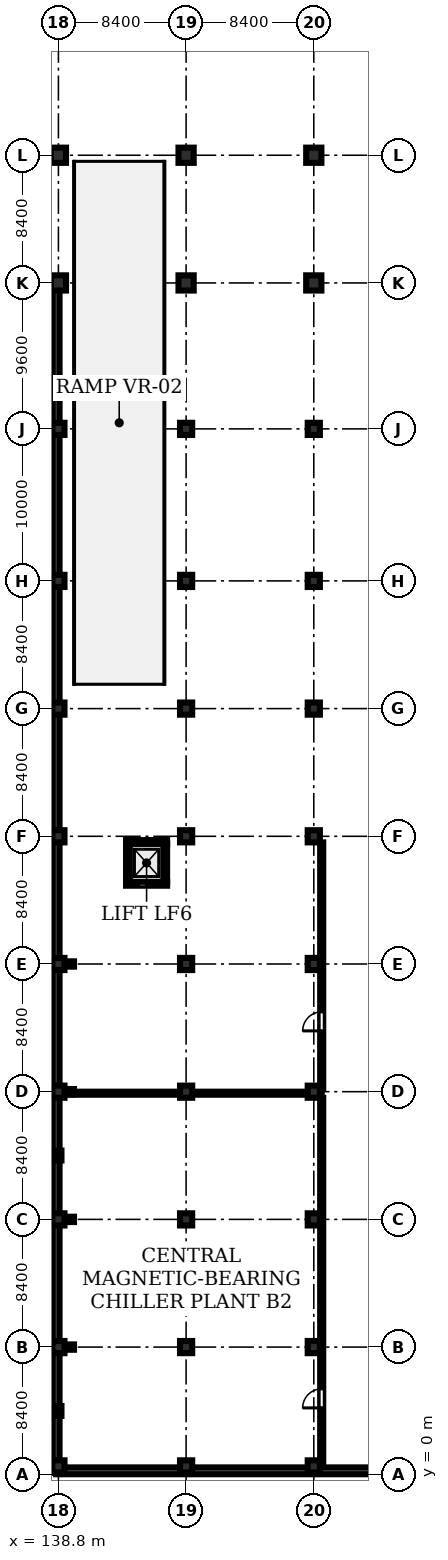
"""IFC4 building model, lengths in metres.
Left out: names, types, materials, properties, quantities, classifications, styles, units other than length and angle.
Written with IfcOpenShell. Run it as: python <this file> out.ifc"""

import sys

from ifc_helpers import new_model, si_unit, direction, frame, frame_2d, origin, origin_2d, place, context, subcontext, project, spatial, rectangle, i_section, extrude, element, fill, save


model = new_model("IFC4")
c1 = context("Model", 3, precision=1e-05, world=origin(), true_north=direction((0.0, 1.0)))
c2 = subcontext(c1, "Body", "Model", "MODEL_VIEW")
j1 = project(units=[si_unit("LENGTHUNIT", "METRE"), si_unit("PLANEANGLEUNIT", "RADIAN")], contexts=[c1])
p1 = place(None, origin())
s1 = spatial("IfcSite", under=j1, at=p1, CompositionType="ELEMENT")
p2 = place(p1, origin())
s2 = spatial("IfcBuilding", under=s1, at=p2, CompositionType="ELEMENT")
p3 = place(p2, frame((0.0, 0.0, -9.6)))
s3 = spatial("IfcBuildingStorey", under=s2, at=p3, CompositionType="ELEMENT", Elevation=-9.6)
for number, where, z_axis, x_axis in (
    (1, (138.8, 0.55, 0.0), (0.0, 0.0, 1.0), (1.0, 0.0, 0.0)),
    (2, (138.8, 8.4, 0.0), (0.0, 0.0, 1.0), (1.0, 0.0, 0.0)),
    (3, (138.8, 16.8, 0.0), (0.0, 0.0, 1.0), (1.0, 0.0, 0.0)),
    (4, (138.8, 25.2, 0.0), (0.0, 0.0, 1.0), (1.0, 0.0, 0.0)),
    (5, (138.8, 33.6, 0.0), (0.0, 0.0, 1.0), (1.0, 0.0, 0.0)),
    (6, (138.8, 42.0, 0.0), (0.0, 0.0, 1.0), (1.0, 0.0, 0.0)),
    (7, (138.8, 50.4, 0.0), (0.0, 0.0, 1.0), (1.0, 0.0, 0.0)),
    (8, (138.8, 58.8, 0.0), (0.0, 0.0, 1.0), (1.0, 0.0, 0.0)),
    (9, (138.8, 68.8, 0.0), (0.0, 0.0, 1.0), (1.0, 0.0, 0.0)),
):
    element("IfcColumn", number, at=place(p3, frame(where, z_axis=z_axis, x_axis=x_axis)), inside=s3, PredefinedType="COLUMN", context=c2, shape_type="SweptSolid", body=[
        extrude(rectangle(XDim=0.8, YDim=0.8, at=origin_2d()), origin(), (0.0, 0.0, 1.0), 4.48),
    ])
for number, where, z_axis, x_axis in (
    (10, (138.8, 78.4, 0.0), (0.0, 0.0, 1.0), (1.0, 0.0, 0.0)),
    (11, (138.8, 86.8, 0.0), (0.0, 0.0, 1.0), (1.0, 0.0, 0.0)),
):
    element("IfcColumn", number, at=place(p3, frame(where, z_axis=z_axis, x_axis=x_axis)), inside=s3, PredefinedType="COLUMN", context=c2, shape_type="SweptSolid", body=[
        extrude(rectangle(XDim=1.0, YDim=1.0, at=origin_2d()), origin(), (0.0, 0.0, 1.0), 4.48),
    ])
for number, where, z_axis, x_axis in (
    (12, (147.2, 0.55, 0.0), (0.0, 0.0, 1.0), (1.0, 0.0, 0.0)),
    (13, (147.2, 8.4, 0.0), (0.0, 0.0, 1.0), (1.0, 0.0, 0.0)),
    (14, (147.2, 16.8, 0.0), (0.0, 0.0, 1.0), (1.0, 0.0, 0.0)),
    (15, (147.2, 25.2, 0.0), (0.0, 0.0, 1.0), (1.0, 0.0, 0.0)),
    (16, (147.2, 33.6, 0.0), (0.0, 0.0, 1.0), (1.0, 0.0, 0.0)),
    (17, (147.2, 42.0, 0.0), (0.0, 0.0, 1.0), (1.0, 0.0, 0.0)),
    (18, (147.2, 50.4, 0.0), (0.0, 0.0, 1.0), (1.0, 0.0, 0.0)),
    (19, (147.2, 58.8, 0.0), (0.0, 0.0, 1.0), (1.0, 0.0, 0.0)),
    (20, (147.2, 68.8, 0.0), (0.0, 0.0, 1.0), (1.0, 0.0, 0.0)),
):
    element("IfcColumn", number, at=place(p3, frame(where, z_axis=z_axis, x_axis=x_axis)), inside=s3, PredefinedType="COLUMN", context=c2, shape_type="SweptSolid", body=[
        extrude(rectangle(XDim=0.8, YDim=0.8, at=origin_2d()), origin(), (0.0, 0.0, 1.0), 4.48),
    ])
for number, where, z_axis, x_axis in (
    (21, (147.2, 78.4, 0.0), (0.0, 0.0, 1.0), (1.0, 0.0, 0.0)),
    (22, (147.2, 86.8, 0.0), (0.0, 0.0, 1.0), (1.0, 0.0, 0.0)),
):
    element("IfcColumn", number, at=place(p3, frame(where, z_axis=z_axis, x_axis=x_axis)), inside=s3, PredefinedType="COLUMN", context=c2, shape_type="SweptSolid", body=[
        extrude(rectangle(XDim=1.0, YDim=1.0, at=origin_2d()), origin(), (0.0, 0.0, 1.0), 4.48),
    ])
for number, where, z_axis, x_axis in (
    (23, (155.6, 0.55, 0.0), (0.0, 0.0, 1.0), (1.0, 0.0, 0.0)),
    (24, (155.6, 8.4, 0.0), (0.0, 0.0, 1.0), (1.0, 0.0, 0.0)),
    (25, (155.6, 16.8, 0.0), (0.0, 0.0, 1.0), (1.0, 0.0, 0.0)),
    (26, (155.6, 25.2, 0.0), (0.0, 0.0, 1.0), (1.0, 0.0, 0.0)),
    (27, (155.6, 33.6, 0.0), (0.0, 0.0, 1.0), (1.0, 0.0, 0.0)),
    (28, (155.6, 42.0, 0.0), (0.0, 0.0, 1.0), (1.0, 0.0, 0.0)),
    (29, (155.6, 50.4, 0.0), (0.0, 0.0, 1.0), (1.0, 0.0, 0.0)),
    (30, (155.6, 58.8, 0.0), (0.0, 0.0, 1.0), (1.0, 0.0, 0.0)),
    (31, (155.6, 68.8, 0.0), (0.0, 0.0, 1.0), (1.0, 0.0, 0.0)),
):
    element("IfcColumn", number, at=place(p3, frame(where, z_axis=z_axis, x_axis=x_axis)), inside=s3, PredefinedType="COLUMN", context=c2, shape_type="SweptSolid", body=[
        extrude(rectangle(XDim=0.8, YDim=0.8, at=origin_2d()), origin(), (0.0, 0.0, 1.0), 4.48),
    ])
for number, where, z_axis, x_axis in (
    (32, (155.6, 78.4, 0.0), (0.0, 0.0, 1.0), (1.0, 0.0, 0.0)),
    (33, (155.6, 86.8, 0.0), (0.0, 0.0, 1.0), (1.0, 0.0, 0.0)),
):
    element("IfcColumn", number, at=place(p3, frame(where, z_axis=z_axis, x_axis=x_axis)), inside=s3, PredefinedType="COLUMN", context=c2, shape_type="SweptSolid", body=[
        extrude(rectangle(XDim=1.0, YDim=1.0, at=origin_2d()), origin(), (0.0, 0.0, 1.0), 4.48),
    ])
for number, where, z_axis, x_axis in (
    (34, (138.8, 4.2, 0.0), (0.0, 0.0, 1.0), (1.0, 0.0, 0.0)),
    (35, (138.8, 21.0, 0.0), (0.0, 0.0, 1.0), (1.0, 0.0, 0.0)),
):
    element("IfcColumn", number, at=place(p3, frame(where, z_axis=z_axis, x_axis=x_axis)), inside=s3, PredefinedType="PILASTER", context=c2, shape_type="SweptSolid", body=[
        extrude(rectangle(XDim=0.4, YDim=0.65, at=origin_2d()), origin(), (0.0, 0.0, 1.0), 4.48),
    ])
p4 = place(p3, frame((0.26, 78.25, 0.0), z_axis=(0.0, 0.0, 1.0), x_axis=(1.0, 0.0, 0.0)))
e36 = element("IfcWall", 36, at=p4, inside=s3, PredefinedType="SHEAR", context=c2, shape_type="SweptSolid", body=[
    extrude(rectangle(XDim=138.39, YDim=0.45, at=frame_2d((69.195, 0.0))), origin(), (0.0, 0.0, 1.0), 3.7),
])
p5 = place(p3, frame((138.65, 78.25, 0.0), z_axis=(0.0, 0.0, 1.0), x_axis=(0.0, -1.0, 0.0)))
e37 = element("IfcWall", 37, at=p5, inside=s3, PredefinedType="SHEAR", context=c2, shape_type="SweptSolid", body=[
    extrude(rectangle(XDim=77.99, YDim=0.45, at=frame_2d((38.995, 0.0))), origin(), (0.0, 0.0, 1.0), 3.7),
])
p6 = place(p3, frame((138.65, 0.26, 0.0), z_axis=(0.0, 0.0, 1.0), x_axis=(1.0, 0.0, 0.0)))
e38 = element("IfcWall", 38, at=p6, inside=s3, PredefinedType="SHEAR", context=c2, shape_type="SweptSolid", body=[
    extrude(rectangle(XDim=25.09, YDim=0.45, at=frame_2d((12.545, 0.0))), origin(), (0.0, 0.0, 1.0), 3.7),
])
p7 = place(p3, frame((143.25, 38.875, 0.0), z_axis=(0.0, 0.0, 1.0), x_axis=(1.0, 0.0, 0.0)))
e39 = element("IfcWall", 39, at=p7, inside=s3, PredefinedType="SHEAR", context=c2, shape_type="SweptSolid", body=[
    extrude(rectangle(XDim=2.7, YDim=0.25, at=frame_2d((1.35, 0.0))), origin(), (0.0, 0.0, 1.0), 4.48),
])
p8 = place(p7, frame((0.835, 0.0, 0.0)))
e40 = element("IfcOpeningElement", 40, at=p8, cuts=e39, PredefinedType="OPENING", context=c2, shape_type="SweptSolid", body=[
    extrude(rectangle(XDim=1.03, YDim=2.15, at=frame_2d((0.515, 1.075))), frame((0.0, 0.135, 0.0), z_axis=(0.0, -1.0, 0.0), x_axis=(1.0, 0.0, 0.0)), (0.0, 0.0, 1.0), 0.27),
])
p9 = place(p3, frame((143.25, 41.625, 0.0), z_axis=(0.0, 0.0, 1.0), x_axis=(1.0, 0.0, 0.0)))
e41 = element("IfcWall", 41, at=p9, inside=s3, PredefinedType="SHEAR", context=c2, shape_type="SweptSolid", body=[
    extrude(rectangle(XDim=2.7, YDim=0.25, at=frame_2d((1.35, 0.0))), origin(), (0.0, 0.0, 1.0), 4.48),
])
for number, where, z_axis, x_axis in (
    (42, (143.375, 39.0, 0.0), (0.0, 0.0, 1.0), (0.0, 1.0, 0.0)),
    (43, (145.825, 39.0, 0.0), (0.0, 0.0, 1.0), (0.0, 1.0, 0.0)),
):
    element("IfcWall", number, at=place(p3, frame(where, z_axis=z_axis, x_axis=x_axis)), inside=s3, PredefinedType="SHEAR", context=c2, shape_type="SweptSolid", body=[
        extrude(rectangle(XDim=2.5, YDim=0.25, at=frame_2d((1.25, 0.0))), origin(), (0.0, 0.0, 1.0), 4.48),
    ])
for number, where, z_axis, x_axis in (
    (44, (139.65, 8.4, 0.0), (0.0, 0.0, 1.0), (1.0, 0.0, 0.0)),
    (45, (139.65, 16.8, 0.0), (0.0, 0.0, 1.0), (1.0, 0.0, 0.0)),
    (46, (139.65, 25.2, 0.0), (0.0, 0.0, 1.0), (1.0, 0.0, 0.0)),
    (47, (139.65, 33.6, 0.0), (0.0, 0.0, 1.0), (1.0, 0.0, 0.0)),
):
    element("IfcColumn", number, at=place(p3, frame(where, z_axis=z_axis, x_axis=x_axis)), inside=s3, PredefinedType="COLUMN", context=c2, shape_type="SweptSolid", body=[
        extrude(i_section(OverallWidth=0.35, OverallDepth=0.35, WebThickness=0.012, FlangeThickness=0.019, at=origin_2d()), origin(), (0.0, 0.0, 1.0), 4.48),
    ])
p10 = place(p3, frame((156.12, 0.6, 0.0), z_axis=(0.0, 0.0, 1.0), x_axis=(0.0, 1.0, 0.0)))
e48 = element("IfcWall", 48, at=p10, inside=s3, PredefinedType="SOLIDWALL", context=c2, shape_type="SweptSolid", body=[
    extrude(rectangle(XDim=24.2, YDim=0.2, at=frame_2d((12.1, 0.0))), origin(), (0.0, 0.0, 1.0), 4.48),
])
p11 = place(p10, frame((3.8, 0.0, 0.0)))
e49 = element("IfcOpeningElement", 49, at=p11, cuts=e48, PredefinedType="OPENING", context=c2, shape_type="SweptSolid", body=[
    extrude(rectangle(XDim=1.25, YDim=2.2, at=frame_2d((0.625, 1.1))), frame((0.0, 0.11, 0.0), z_axis=(0.0, -1.0, 0.0), x_axis=(1.0, 0.0, 0.0)), (0.0, 0.0, 1.0), 0.22),
])
p12 = place(p3, frame((156.12, 25.4, 0.0), z_axis=(0.0, 0.0, 1.0), x_axis=(0.0, 1.0, 0.0)))
e50 = element("IfcWall", 50, at=p12, inside=s3, PredefinedType="SOLIDWALL", context=c2, shape_type="SweptSolid", body=[
    extrude(rectangle(XDim=16.2, YDim=0.2, at=frame_2d((8.1, 0.0))), origin(), (0.0, 0.0, 1.0), 4.48),
])
p13 = place(p12, frame((3.8, 0.0, 0.0)))
e51 = element("IfcOpeningElement", 51, at=p13, cuts=e50, PredefinedType="OPENING", context=c2, shape_type="SweptSolid", body=[
    extrude(rectangle(XDim=1.25, YDim=2.2, at=frame_2d((0.625, 1.1))), frame((0.0, 0.11, 0.0), z_axis=(0.0, -1.0, 0.0), x_axis=(1.0, 0.0, 0.0)), (0.0, 0.0, 1.0), 0.22),
])
p14 = place(p3, frame((139.3, 25.1, 0.0), z_axis=(0.0, 0.0, 1.0), x_axis=(1.0, 0.0, 0.0)))
e52 = element("IfcWall", 52, at=p14, inside=s3, PredefinedType="SOLIDWALL", context=c2, shape_type="SweptSolid", body=[
    extrude(rectangle(XDim=16.82, YDim=0.2, at=frame_2d((8.41, 0.0))), origin(), (0.0, 0.0, 1.0), 3.63),
])
p15 = place(p11, origin())
e53 = element("IfcDoor", 53, at=p15, inside=s3, OperationType="SINGLE_SWING_LEFT", PredefinedType="DOOR", context=c2, shape_type="SweptSolid", body=[
    extrude(rectangle(XDim=1.25, YDim=2.2, at=frame_2d((0.625, 1.1))), frame((0.0, 0.025, 0.0), z_axis=(0.0, -1.0, 0.0), x_axis=(1.0, 0.0, 0.0)), (0.0, 0.0, 1.0), 0.05),
])
fill(e49, e53)
p16 = place(p13, origin())
e54 = element("IfcDoor", 54, at=p16, inside=s3, OperationType="SINGLE_SWING_LEFT", PredefinedType="DOOR", context=c2, shape_type="SweptSolid", body=[
    extrude(rectangle(XDim=1.25, YDim=2.2, at=frame_2d((0.625, 1.1))), frame((0.0, 0.025, 0.0), z_axis=(0.0, -1.0, 0.0), x_axis=(1.0, 0.0, 0.0)), (0.0, 0.0, 1.0), 0.05),
])
fill(e51, e54)
p17 = place(p8, origin())
e55 = element("IfcDoor", 55, at=p17, inside=s3, OperationType="SLIDING_TO_LEFT", PredefinedType="DOOR", context=c2, shape_type="SweptSolid", body=[
    extrude(rectangle(XDim=1.03, YDim=2.15, at=frame_2d((0.515, 1.075))), frame((0.0, 0.025, 0.0), z_axis=(0.0, -1.0, 0.0), x_axis=(1.0, 0.0, 0.0)), (0.0, 0.0, 1.0), 0.05),
])
fill(e40, e55)
save(model, sys.argv[1])
